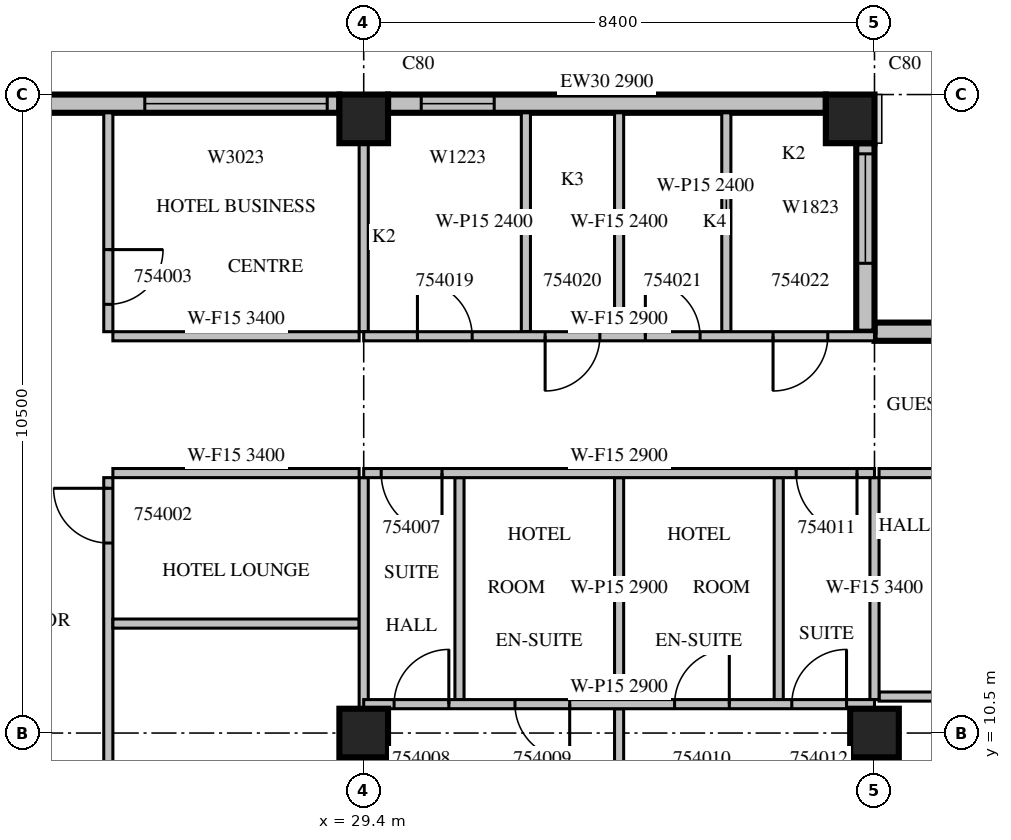
"""IFC4 building model, lengths in metres.
Left out: names, types, materials, properties, quantities, classifications, styles, units other than length and angle.
Written with IfcOpenShell. Run it as: python <this file> out.ifc"""

import sys

from ifc_helpers import new_model, si_unit, direction, frame, frame_2d, origin, origin_2d, place, context, subcontext, project, spatial, rectangle, extrude, source, transform, mapped, element, fill, save


model = new_model("IFC4")
c1 = context("Model", 3, precision=1e-05, world=origin(), true_north=direction((0.0, 1.0)))
c2 = subcontext(c1, "Body", "Model", "MODEL_VIEW")
j1 = project(units=[si_unit("LENGTHUNIT", "METRE"), si_unit("PLANEANGLEUNIT", "RADIAN")], contexts=[c1])
p1 = place(None, origin())
s1 = spatial("IfcSite", under=j1, at=p1, CompositionType="ELEMENT")
p2 = place(p1, origin())
s2 = spatial("IfcBuilding", under=s1, at=p2, CompositionType="ELEMENT")
p3 = place(p2, frame((0.0, 0.0, 238.6)))
s3 = spatial("IfcBuildingStorey", under=s2, at=p3, CompositionType="ELEMENT", Elevation=238.6)
m1 = source(origin(), c2, "Body", "SweptSolid", [
    extrude(rectangle(XDim=0.8, YDim=0.8, at=origin_2d()), origin(), (0.0, 0.0, 1.0), 3.8),
])
for number, where, z_axis, x_axis in (
    (1, (29.4, 10.5, 0.0), (0.0, 0.0, 1.0), (1.0, 0.0, 0.0)),
    (2, (37.8, 10.5, 0.0), (0.0, 0.0, 1.0), (1.0, 0.0, 0.0)),
    (3, (29.4, 20.6, 0.0), (0.0, 0.0, 1.0), (1.0, 0.0, 0.0)),
    (4, (37.4, 20.6, 0.0), (0.0, 0.0, 1.0), (1.0, 0.0, 0.0)),
):
    element("IfcColumn", number, at=place(p3, frame(where, z_axis=z_axis, x_axis=x_axis)), inside=s3, PredefinedType="COLUMN", context=c2, shape_type="MappedRepresentation", body=[
        mapped(m1, transform((0.0, 0.0, 0.0), scale=1.0)),
    ])
m2 = source(origin(), c2, "Body", "SweptSolid", [
    extrude(rectangle(XDim=15.96, YDim=0.3, at=frame_2d((7.98, 0.0))), origin(), (0.0, 0.0, 1.0), 3.4),
])
p4 = place(p3, frame((53.76, 17.1, 0.0), z_axis=(0.0, 0.0, 1.0), x_axis=(-1.0, 0.0, 0.0)))
e5 = element("IfcWall", 5, at=p4, inside=s3, PredefinedType="STANDARD", context=c2, shape_type="MappedRepresentation", body=[
    mapped(m2, transform((0.0, 0.0, 0.0), scale=1.0)),
])
m3 = source(origin(), c2, "Body", "SweptSolid", [
    extrude(rectangle(XDim=3.0, YDim=2.3, at=frame_2d((1.5, 1.15))), frame((0.0, 0.16, 0.0), z_axis=(0.0, -1.0, 0.0), x_axis=(1.0, 0.0, 0.0)), (0.0, 0.0, 1.0), 0.32),
])
p5 = place(p4, frame((0.6, 0.0, 0.6)))
e6 = element("IfcOpeningElement", 6, at=p5, cuts=e5, PredefinedType="OPENING", context=c2, shape_type="MappedRepresentation", body=[
    mapped(m3, transform((0.0, 0.0, 0.0), scale=1.0)),
])
p6 = place(p4, frame((4.8, 0.0, 0.6)))
e7 = element("IfcOpeningElement", 7, at=p6, cuts=e5, PredefinedType="OPENING", context=c2, shape_type="MappedRepresentation", body=[
    mapped(m3, transform((0.0, 0.0, 0.0), scale=1.0)),
])
m4 = source(origin(), c2, "Body", "SweptSolid", [
    extrude(rectangle(XDim=3.6, YDim=2.3, at=frame_2d((1.8, 1.15))), frame((0.0, 0.16, 0.0), z_axis=(0.0, -1.0, 0.0), x_axis=(1.0, 0.0, 0.0)), (0.0, 0.0, 1.0), 0.32),
])
p7 = place(p4, frame((9.54, 0.0, 0.6)))
e8 = element("IfcOpeningElement", 8, at=p7, cuts=e5, PredefinedType="OPENING", context=c2, shape_type="MappedRepresentation", body=[
    mapped(m4, transform((0.0, 0.0, 0.0), scale=1.0)),
])
m5 = source(origin(), c2, "Body", "SweptSolid", [
    extrude(rectangle(XDim=3.1, YDim=0.3, at=frame_2d((1.55, 0.0))), origin(), (0.0, 0.0, 1.0), 3.4),
])
p8 = place(p3, frame((37.65, 17.1, 0.0), z_axis=(0.0, 0.0, 1.0), x_axis=(0.0, 1.0, 0.0)))
e9 = element("IfcWall", 9, at=p8, inside=s3, PredefinedType="STANDARD", context=c2, shape_type="MappedRepresentation", body=[
    mapped(m5, transform((0.0, 0.0, 0.0), scale=1.0)),
])
m6 = source(origin(), c2, "Body", "SweptSolid", [
    extrude(rectangle(XDim=1.8, YDim=2.3, at=frame_2d((0.9, 1.15))), frame((0.0, 0.16, 0.0), z_axis=(0.0, -1.0, 0.0), x_axis=(1.0, 0.0, 0.0)), (0.0, 0.0, 1.0), 0.32),
])
p9 = place(p8, frame((1.125, 0.0, 0.6)))
e10 = element("IfcOpeningElement", 10, at=p9, cuts=e9, PredefinedType="OPENING", context=c2, shape_type="MappedRepresentation", body=[
    mapped(m6, transform((0.0, 0.0, 0.0), scale=1.0)),
])
m7 = source(origin(), c2, "Body", "SweptSolid", [
    extrude(rectangle(XDim=7.2, YDim=0.3, at=frame_2d((3.6, 0.0))), origin(), (0.0, 0.0, 1.0), 2.9),
])
p10 = place(p3, frame((37.0, 20.85, 0.0), z_axis=(0.0, 0.0, 1.0), x_axis=(-1.0, 0.0, 0.0)))
e11 = element("IfcWall", 11, at=p10, inside=s3, PredefinedType="STANDARD", context=c2, shape_type="MappedRepresentation", body=[
    mapped(m7, transform((0.0, 0.0, 0.0), scale=1.0)),
])
m8 = source(origin(), c2, "Body", "SweptSolid", [
    extrude(rectangle(XDim=1.2, YDim=2.3, at=frame_2d((0.6, 1.15))), frame((0.0, 0.16, 0.0), z_axis=(0.0, -1.0, 0.0), x_axis=(1.0, 0.0, 0.0)), (0.0, 0.0, 1.0), 0.32),
])
p11 = place(p10, frame((5.454, 0.0, 0.6)))
e12 = element("IfcOpeningElement", 12, at=p11, cuts=e11, PredefinedType="OPENING", context=c2, shape_type="MappedRepresentation", body=[
    mapped(m8, transform((0.0, 0.0, 0.0), scale=1.0)),
])
m9 = source(origin(), c2, "Body", "SweptSolid", [
    extrude(rectangle(XDim=7.2, YDim=0.3, at=frame_2d((3.6, 0.0))), origin(), (0.0, 0.0, 1.0), 3.4),
])
p12 = place(p3, frame((29.0, 20.85, 0.0), z_axis=(0.0, 0.0, 1.0), x_axis=(-1.0, 0.0, 0.0)))
e13 = element("IfcWall", 13, at=p12, inside=s3, PredefinedType="STANDARD", context=c2, shape_type="MappedRepresentation", body=[
    mapped(m9, transform((0.0, 0.0, 0.0), scale=1.0)),
])
p13 = place(p12, frame((0.2, 0.0, 0.6)))
e14 = element("IfcOpeningElement", 14, at=p13, cuts=e13, PredefinedType="OPENING", context=c2, shape_type="MappedRepresentation", body=[
    mapped(m3, transform((0.0, 0.0, 0.0), scale=1.0)),
])
p14 = place(p12, frame((5.0, 0.0, 0.6)))
e15 = element("IfcOpeningElement", 15, at=p14, cuts=e13, PredefinedType="OPENING", context=c2, shape_type="MappedRepresentation", body=[
    mapped(m6, transform((0.0, 0.0, 0.0), scale=1.0)),
])
m10 = source(origin(), c2, "Body", "SweptSolid", [
    extrude(rectangle(XDim=11.225, YDim=0.15, at=frame_2d((5.612, 0.0))), origin(), (0.0, 0.0, 1.0), 2.4),
])
p15 = place(p3, frame((25.2, 14.7, 0.0), z_axis=(0.0, 0.0, 1.0), x_axis=(0.0, -1.0, 0.0)))
e16 = element("IfcWall", 16, at=p15, inside=s3, PredefinedType="PARTITIONING", context=c2, shape_type="MappedRepresentation", body=[
    mapped(m10, transform((0.0, 0.0, 0.0), scale=1.0)),
])
m11 = source(origin(), c2, "Body", "SweptSolid", [
    extrude(rectangle(XDim=0.9, YDim=2.1, at=frame_2d((0.45, 1.05))), frame((0.0, 0.085, 0.0), z_axis=(0.0, -1.0, 0.0), x_axis=(1.0, 0.0, 0.0)), (0.0, 0.0, 1.0), 0.17),
])
p16 = place(p15, frame((6.662, 0.0, 0.0)))
e17 = element("IfcOpeningElement", 17, at=p16, cuts=e16, PredefinedType="OPENING", context=c2, shape_type="MappedRepresentation", body=[
    mapped(m11, transform((0.0, 0.0, 0.0), scale=1.0)),
])
p17 = place(p15, frame((0.175, 0.0, 0.0)))
e18 = element("IfcOpeningElement", 18, at=p17, cuts=e16, PredefinedType="OPENING", context=c2, shape_type="MappedRepresentation", body=[
    mapped(m11, transform((0.0, 0.0, 0.0), scale=1.0)),
])
m12 = source(origin(), c2, "Body", "SweptSolid", [
    extrude(rectangle(XDim=3.6, YDim=0.15, at=frame_2d((1.8, 0.0))), origin(), (0.0, 0.0, 1.0), 3.4),
])
p18 = place(p3, frame((25.2, 20.7, 0.0), z_axis=(0.0, 0.0, 1.0), x_axis=(0.0, -1.0, 0.0)))
e19 = element("IfcWall", 19, at=p18, inside=s3, PredefinedType="PARTITIONING", context=c2, shape_type="MappedRepresentation", body=[
    mapped(m12, transform((0.0, 0.0, 0.0), scale=1.0)),
])
p19 = place(p18, frame((2.25, 0.0, 0.0)))
e20 = element("IfcOpeningElement", 20, at=p19, cuts=e19, PredefinedType="OPENING", context=c2, shape_type="MappedRepresentation", body=[
    mapped(m11, transform((0.0, 0.0, 0.0), scale=1.0)),
])
m13 = source(origin(), c2, "Body", "SweptSolid", [
    extrude(rectangle(XDim=4.05, YDim=0.15, at=frame_2d((2.025, 0.0))), origin(), (0.0, 0.0, 1.0), 3.4),
])
for number, where, z_axis, x_axis in (
    (21, (29.325, 12.3, 0.0), (0.0, 0.0, 1.0), (-1.0, 0.0, 0.0)),
    (22, (29.325, 14.775, 0.0), (0.0, 0.0, 1.0), (-1.0, 0.0, 0.0)),
    (23, (25.275, 17.025, 0.0), (0.0, 0.0, 1.0), (1.0, 0.0, 0.0)),
):
    element("IfcWall", number, at=place(p3, frame(where, z_axis=z_axis, x_axis=x_axis)), inside=s3, PredefinedType="PARTITIONING", context=c2, shape_type="MappedRepresentation", body=[
        mapped(m13, transform((0.0, 0.0, 0.0), scale=1.0)),
    ])
m14 = source(origin(), c2, "Body", "SweptSolid", [
    extrude(rectangle(XDim=6.626, YDim=0.15, at=frame_2d((3.313, 0.0))), origin(), (0.0, 0.0, 1.0), 3.4),
])
p20 = place(p3, frame((29.4, 3.475, 0.0), z_axis=(0.0, 0.0, 1.0), x_axis=(0.0, 1.0, 0.0)))
e24 = element("IfcWall", 24, at=p20, inside=s3, PredefinedType="PARTITIONING", context=c2, shape_type="MappedRepresentation", body=[
    mapped(m14, transform((0.0, 0.0, 0.0), scale=1.0)),
])
p21 = place(p3, frame((29.4, 10.899, 0.0), z_axis=(0.0, 0.0, 1.0), x_axis=(0.0, 1.0, 0.0)))
e25 = element("IfcWall", 25, at=p21, inside=s3, PredefinedType="PARTITIONING", context=c2, shape_type="SweptSolid", body=[
    extrude(rectangle(XDim=3.801, YDim=0.15, at=frame_2d((1.901, 0.0))), origin(), (0.0, 0.0, 1.0), 3.4),
])
m15 = source(origin(), c2, "Body", "SweptSolid", [
    extrude(rectangle(XDim=3.101, YDim=0.15, at=frame_2d((1.55, 0.0))), origin(), (0.0, 0.0, 1.0), 3.4),
])
p22 = place(p3, frame((29.4, 17.1, 0.0), z_axis=(0.0, 0.0, 1.0), x_axis=(0.0, 1.0, 0.0)))
e26 = element("IfcWall", 26, at=p22, inside=s3, PredefinedType="PARTITIONING", context=c2, shape_type="MappedRepresentation", body=[
    mapped(m15, transform((0.0, 0.0, 0.0), scale=1.0)),
])
m16 = source(origin(), c2, "Body", "SweptSolid", [
    extrude(rectangle(XDim=6.45, YDim=0.15, at=frame_2d((3.225, 0.0))), origin(), (0.0, 0.0, 1.0), 3.4),
])
p23 = place(p3, frame((37.875, 11.1, 0.0), z_axis=(0.0, 0.0, 1.0), x_axis=(1.0, 0.0, 0.0)))
e27 = element("IfcWall", 27, at=p23, inside=s3, PredefinedType="PARTITIONING", context=c2, shape_type="MappedRepresentation", body=[
    mapped(m16, transform((0.0, 0.0, 0.0), scale=1.0)),
])
p24 = place(p3, frame((44.325, 14.775, 0.0), z_axis=(0.0, 0.0, 1.0), x_axis=(-1.0, 0.0, 0.0)))
e28 = element("IfcWall", 28, at=p24, inside=s3, PredefinedType="PARTITIONING", context=c2, shape_type="MappedRepresentation", body=[
    mapped(m16, transform((0.0, 0.0, 0.0), scale=1.0)),
])
p25 = place(p24, frame((2.812, 0.0, 0.0)))
e29 = element("IfcOpeningElement", 29, at=p25, cuts=e28, PredefinedType="OPENING", context=c2, shape_type="MappedRepresentation", body=[
    mapped(m11, transform((0.0, 0.0, 0.0), scale=1.0)),
])
m17 = source(origin(), c2, "Body", "SweptSolid", [
    extrude(rectangle(XDim=10.6, YDim=0.15, at=frame_2d((5.3, 0.0))), origin(), (0.0, 0.0, 1.0), 2.4),
])
p26 = place(p3, frame((33.6, 0.3, 0.0), z_axis=(0.0, 0.0, 1.0), x_axis=(0.0, 1.0, 0.0)))
e30 = element("IfcWall", 30, at=p26, inside=s3, PredefinedType="PARTITIONING", context=c2, shape_type="MappedRepresentation", body=[
    mapped(m17, transform((0.0, 0.0, 0.0), scale=1.0)),
])
p27 = place(p26, frame((6.35, 0.0, 0.0)))
e31 = element("IfcOpeningElement", 31, at=p27, cuts=e30, PredefinedType="OPENING", context=c2, shape_type="MappedRepresentation", body=[
    mapped(m11, transform((0.0, 0.0, 0.0), scale=1.0)),
])
p28 = place(p3, frame((30.975, 11.05, 0.0), z_axis=(0.0, 0.0, 1.0), x_axis=(0.0, 1.0, 0.0)))
e32 = element("IfcWall", 32, at=p28, inside=s3, PredefinedType="PARTITIONING", context=c2, shape_type="SweptSolid", body=[
    extrude(rectangle(XDim=3.65, YDim=0.15, at=frame_2d((1.825, 0.0))), origin(), (0.0, 0.0, 1.0), 3.4),
])
p29 = place(p3, frame((33.6, 11.05, 0.0), z_axis=(0.0, 0.0, 1.0), x_axis=(0.0, 1.0, 0.0)))
e33 = element("IfcWall", 33, at=p29, inside=s3, PredefinedType="PARTITIONING", context=c2, shape_type="SweptSolid", body=[
    extrude(rectangle(XDim=3.65, YDim=0.15, at=frame_2d((1.825, 0.0))), origin(), (0.0, 0.0, 1.0), 2.9),
])
m18 = source(origin(), c2, "Body", "SweptSolid", [
    extrude(rectangle(XDim=3.65, YDim=0.15, at=frame_2d((1.825, 0.0))), origin(), (0.0, 0.0, 1.0), 3.4),
])
p30 = place(p3, frame((36.225, 11.05, 0.0), z_axis=(0.0, 0.0, 1.0), x_axis=(0.0, 1.0, 0.0)))
e34 = element("IfcWall", 34, at=p30, inside=s3, PredefinedType="PARTITIONING", context=c2, shape_type="MappedRepresentation", body=[
    mapped(m18, transform((0.0, 0.0, 0.0), scale=1.0)),
])
m19 = source(origin(), c2, "Body", "SweptSolid", [
    extrude(rectangle(XDim=9.302, YDim=0.15, at=frame_2d((4.651, 0.0))), origin(), (0.0, 0.0, 1.0), 3.4),
])
p31 = place(p3, frame((37.8, 0.799, 0.0), z_axis=(0.0, 0.0, 1.0), x_axis=(0.0, 1.0, 0.0)))
e35 = element("IfcWall", 35, at=p31, inside=s3, PredefinedType="PARTITIONING", context=c2, shape_type="MappedRepresentation", body=[
    mapped(m19, transform((0.0, 0.0, 0.0), scale=1.0)),
])
p32 = place(p3, frame((37.8, 11.05, 0.0), z_axis=(0.0, 0.0, 1.0), x_axis=(0.0, 1.0, 0.0)))
e36 = element("IfcWall", 36, at=p32, inside=s3, PredefinedType="PARTITIONING", context=c2, shape_type="MappedRepresentation", body=[
    mapped(m18, transform((0.0, 0.0, 0.0), scale=1.0)),
])
m20 = source(origin(), c2, "Body", "SweptSolid", [
    extrude(rectangle(XDim=8.4, YDim=0.15, at=frame_2d((4.2, 0.0))), origin(), (0.0, 0.0, 1.0), 2.9),
])
p33 = place(p3, frame((37.8, 10.975, 0.0), z_axis=(0.0, 0.0, 1.0), x_axis=(-1.0, 0.0, 0.0)))
e37 = element("IfcWall", 37, at=p33, inside=s3, PredefinedType="PARTITIONING", context=c2, shape_type="MappedRepresentation", body=[
    mapped(m20, transform((0.0, 0.0, 0.0), scale=1.0)),
])
p34 = place(p33, frame((7.0, 0.0, 0.0)))
e38 = element("IfcOpeningElement", 38, at=p34, cuts=e37, PredefinedType="OPENING", context=c2, shape_type="MappedRepresentation", body=[
    mapped(m11, transform((0.0, 0.0, 0.0), scale=1.0)),
])
p35 = place(p33, frame((5.013, 0.0, 0.0)))
e39 = element("IfcOpeningElement", 39, at=p35, cuts=e37, PredefinedType="OPENING", context=c2, shape_type="MappedRepresentation", body=[
    mapped(m11, transform((0.0, 0.0, 0.0), scale=1.0)),
])
p36 = place(p33, frame((2.388, 0.0, 0.0)))
e40 = element("IfcOpeningElement", 40, at=p36, cuts=e37, PredefinedType="OPENING", context=c2, shape_type="MappedRepresentation", body=[
    mapped(m11, transform((0.0, 0.0, 0.0), scale=1.0)),
])
p37 = place(p33, frame((0.46, 0.0, 0.0)))
e41 = element("IfcOpeningElement", 41, at=p37, cuts=e37, PredefinedType="OPENING", context=c2, shape_type="MappedRepresentation", body=[
    mapped(m11, transform((0.0, 0.0, 0.0), scale=1.0)),
])
m21 = source(origin(), c2, "Body", "SweptSolid", [
    extrude(rectangle(XDim=3.6, YDim=0.15, at=frame_2d((1.8, 0.0))), origin(), (0.0, 0.0, 1.0), 2.4),
])
for number, where, z_axis, x_axis in (
    (42, (32.067, 20.7, 0.0), (0.0, 0.0, 1.0), (0.0, -1.0, 0.0)),
    (43, (35.363, 20.7, 0.0), (0.0, 0.0, 1.0), (0.0, -1.0, 0.0)),
    (44, (33.6, 17.1, 0.0), (0.0, 0.0, 1.0), (0.0, 1.0, 0.0)),
):
    element("IfcWall", number, at=place(p3, frame(where, z_axis=z_axis, x_axis=x_axis)), inside=s3, PredefinedType="PARTITIONING", context=c2, shape_type="MappedRepresentation", body=[
        mapped(m21, transform((0.0, 0.0, 0.0), scale=1.0)),
    ])
p38 = place(p3, frame((37.8, 14.775, 0.0), z_axis=(0.0, 0.0, 1.0), x_axis=(-1.0, 0.0, 0.0)))
e45 = element("IfcWall", 45, at=p38, inside=s3, PredefinedType="PARTITIONING", context=c2, shape_type="MappedRepresentation", body=[
    mapped(m20, transform((0.0, 0.0, 0.0), scale=1.0)),
])
m22 = source(origin(), c2, "Body", "SweptSolid", [
    extrude(rectangle(XDim=1.0, YDim=2.1, at=frame_2d((0.5, 1.05))), frame((0.0, 0.085, 0.0), z_axis=(0.0, -1.0, 0.0), x_axis=(1.0, 0.0, 0.0)), (0.0, 0.0, 1.0), 0.17),
])
p39 = place(p38, frame((7.112, 0.0, 0.0)))
e46 = element("IfcOpeningElement", 46, at=p39, cuts=e45, PredefinedType="OPENING", context=c2, shape_type="MappedRepresentation", body=[
    mapped(m22, transform((0.0, 0.0, 0.0), scale=1.0)),
])
p40 = place(p38, frame((0.287, 0.0, 0.0)))
e47 = element("IfcOpeningElement", 47, at=p40, cuts=e45, PredefinedType="OPENING", context=c2, shape_type="MappedRepresentation", body=[
    mapped(m22, transform((0.0, 0.0, 0.0), scale=1.0)),
])
p41 = place(p3, frame((29.4, 17.025, 0.0), z_axis=(0.0, 0.0, 1.0), x_axis=(1.0, 0.0, 0.0)))
e48 = element("IfcWall", 48, at=p41, inside=s3, PredefinedType="PARTITIONING", context=c2, shape_type="MappedRepresentation", body=[
    mapped(m20, transform((0.0, 0.0, 0.0), scale=1.0)),
])
p42 = place(p41, frame((0.883, 0.0, 0.0)))
e49 = element("IfcOpeningElement", 49, at=p42, cuts=e48, PredefinedType="OPENING", context=c2, shape_type="MappedRepresentation", body=[
    mapped(m11, transform((0.0, 0.0, 0.0), scale=1.0)),
])
p43 = place(p41, frame((2.983, 0.0, 0.0)))
e50 = element("IfcOpeningElement", 50, at=p43, cuts=e48, PredefinedType="OPENING", context=c2, shape_type="MappedRepresentation", body=[
    mapped(m11, transform((0.0, 0.0, 0.0), scale=1.0)),
])
p44 = place(p41, frame((4.632, 0.0, 0.0)))
e51 = element("IfcOpeningElement", 51, at=p44, cuts=e48, PredefinedType="OPENING", context=c2, shape_type="MappedRepresentation", body=[
    mapped(m11, transform((0.0, 0.0, 0.0), scale=1.0)),
])
p45 = place(p41, frame((6.732, 0.0, 0.0)))
e52 = element("IfcOpeningElement", 52, at=p45, cuts=e48, PredefinedType="OPENING", context=c2, shape_type="MappedRepresentation", body=[
    mapped(m11, transform((0.0, 0.0, 0.0), scale=1.0)),
])
m23 = source(origin(), c2, "Body", "SweptSolid", [
    extrude(rectangle(XDim=1.8, YDim=2.3, at=frame_2d((0.9, 1.15))), frame((0.0, 0.03, 0.0), z_axis=(0.0, -1.0, 0.0), x_axis=(1.0, 0.0, 0.0)), (0.0, 0.0, 1.0), 0.06),
])
p46 = place(p9, origin())
e53 = element("IfcWindow", 53, at=p46, inside=s3, PartitioningType="SINGLE_PANEL", PredefinedType="WINDOW", context=c2, shape_type="MappedRepresentation", body=[
    mapped(m23, transform((0.0, 0.0, 0.0), scale=1.0)),
])
fill(e10, e53)
m24 = source(origin(), c2, "Body", "SweptSolid", [
    extrude(rectangle(XDim=1.2, YDim=2.3, at=frame_2d((0.6, 1.15))), frame((0.0, 0.03, 0.0), z_axis=(0.0, -1.0, 0.0), x_axis=(1.0, 0.0, 0.0)), (0.0, 0.0, 1.0), 0.06),
])
p47 = place(p11, origin())
e54 = element("IfcWindow", 54, at=p47, inside=s3, PartitioningType="SINGLE_PANEL", PredefinedType="WINDOW", context=c2, shape_type="MappedRepresentation", body=[
    mapped(m24, transform((0.0, 0.0, 0.0), scale=1.0)),
])
fill(e12, e54)
m25 = source(origin(), c2, "Body", "SweptSolid", [
    extrude(rectangle(XDim=3.0, YDim=2.3, at=frame_2d((1.5, 1.15))), frame((0.0, 0.03, 0.0), z_axis=(0.0, -1.0, 0.0), x_axis=(1.0, 0.0, 0.0)), (0.0, 0.0, 1.0), 0.06),
])
p48 = place(p13, origin())
e55 = element("IfcWindow", 55, at=p48, inside=s3, PartitioningType="SINGLE_PANEL", PredefinedType="WINDOW", context=c2, shape_type="MappedRepresentation", body=[
    mapped(m25, transform((0.0, 0.0, 0.0), scale=1.0)),
])
fill(e14, e55)
m26 = source(origin(), c2, "Body", "SweptSolid", [
    extrude(rectangle(XDim=0.9, YDim=2.1, at=frame_2d((0.45, 1.05))), frame((0.0, 0.025, 0.0), z_axis=(0.0, -1.0, 0.0), x_axis=(1.0, 0.0, 0.0)), (0.0, 0.0, 1.0), 0.05),
])
p49 = place(p17, origin())
e56 = element("IfcDoor", 56, at=p49, inside=s3, OperationType="SINGLE_SWING_RIGHT", PredefinedType="DOOR", context=c2, shape_type="MappedRepresentation", body=[
    mapped(m26, transform((0.0, 0.0, 0.0), scale=1.0)),
])
fill(e18, e56)
p50 = place(p19, origin())
e57 = element("IfcDoor", 57, at=p50, inside=s3, OperationType="SINGLE_SWING_LEFT", PredefinedType="DOOR", context=c2, shape_type="MappedRepresentation", body=[
    mapped(m26, transform((0.0, 0.0, 0.0), scale=1.0)),
])
fill(e20, e57)
m27 = source(origin(), c2, "Body", "SweptSolid", [
    extrude(rectangle(XDim=1.0, YDim=2.1, at=frame_2d((0.5, 1.05))), frame((0.0, 0.025, 0.0), z_axis=(0.0, -1.0, 0.0), x_axis=(1.0, 0.0, 0.0)), (0.0, 0.0, 1.0), 0.05),
])
p51 = place(p39, origin())
e58 = element("IfcDoor", 58, at=p51, inside=s3, OperationType="SINGLE_SWING_LEFT", PredefinedType="DOOR", context=c2, shape_type="MappedRepresentation", body=[
    mapped(m27, transform((0.0, 0.0, 0.0), scale=1.0)),
])
fill(e46, e58)
p52 = place(p34, origin())
e59 = element("IfcDoor", 59, at=p52, inside=s3, OperationType="SINGLE_SWING_RIGHT", PredefinedType="DOOR", context=c2, shape_type="MappedRepresentation", body=[
    mapped(m26, transform((0.0, 0.0, 0.0), scale=1.0)),
])
fill(e38, e59)
p53 = place(p35, origin())
e60 = element("IfcDoor", 60, at=p53, inside=s3, OperationType="SINGLE_SWING_LEFT", PredefinedType="DOOR", context=c2, shape_type="MappedRepresentation", body=[
    mapped(m26, transform((0.0, 0.0, 0.0), scale=1.0)),
])
fill(e39, e60)
p54 = place(p36, origin())
e61 = element("IfcDoor", 61, at=p54, inside=s3, OperationType="SINGLE_SWING_RIGHT", PredefinedType="DOOR", context=c2, shape_type="MappedRepresentation", body=[
    mapped(m26, transform((0.0, 0.0, 0.0), scale=1.0)),
])
fill(e40, e61)
p55 = place(p40, origin())
e62 = element("IfcDoor", 62, at=p55, inside=s3, OperationType="SINGLE_SWING_LEFT", PredefinedType="DOOR", context=c2, shape_type="MappedRepresentation", body=[
    mapped(m27, transform((0.0, 0.0, 0.0), scale=1.0)),
])
fill(e47, e62)
p56 = place(p37, origin())
e63 = element("IfcDoor", 63, at=p56, inside=s3, OperationType="SINGLE_SWING_RIGHT", PredefinedType="DOOR", context=c2, shape_type="MappedRepresentation", body=[
    mapped(m26, transform((0.0, 0.0, 0.0), scale=1.0)),
])
fill(e41, e63)
p57 = place(p42, origin())
e64 = element("IfcDoor", 64, at=p57, inside=s3, OperationType="SINGLE_SWING_LEFT", PredefinedType="DOOR", context=c2, shape_type="MappedRepresentation", body=[
    mapped(m26, transform((0.0, 0.0, 0.0), scale=1.0)),
])
fill(e49, e64)
p58 = place(p43, origin())
e65 = element("IfcDoor", 65, at=p58, inside=s3, OperationType="SINGLE_SWING_RIGHT", PredefinedType="DOOR", context=c2, shape_type="MappedRepresentation", body=[
    mapped(m26, transform((0.0, 0.0, 0.0), scale=1.0)),
])
fill(e50, e65)
p59 = place(p44, origin())
e66 = element("IfcDoor", 66, at=p59, inside=s3, OperationType="SINGLE_SWING_LEFT", PredefinedType="DOOR", context=c2, shape_type="MappedRepresentation", body=[
    mapped(m26, transform((0.0, 0.0, 0.0), scale=1.0)),
])
fill(e51, e66)
p60 = place(p45, origin())
e67 = element("IfcDoor", 67, at=p60, inside=s3, OperationType="SINGLE_SWING_RIGHT", PredefinedType="DOOR", context=c2, shape_type="MappedRepresentation", body=[
    mapped(m26, transform((0.0, 0.0, 0.0), scale=1.0)),
])
fill(e52, e67)
save(model, sys.argv[1])
